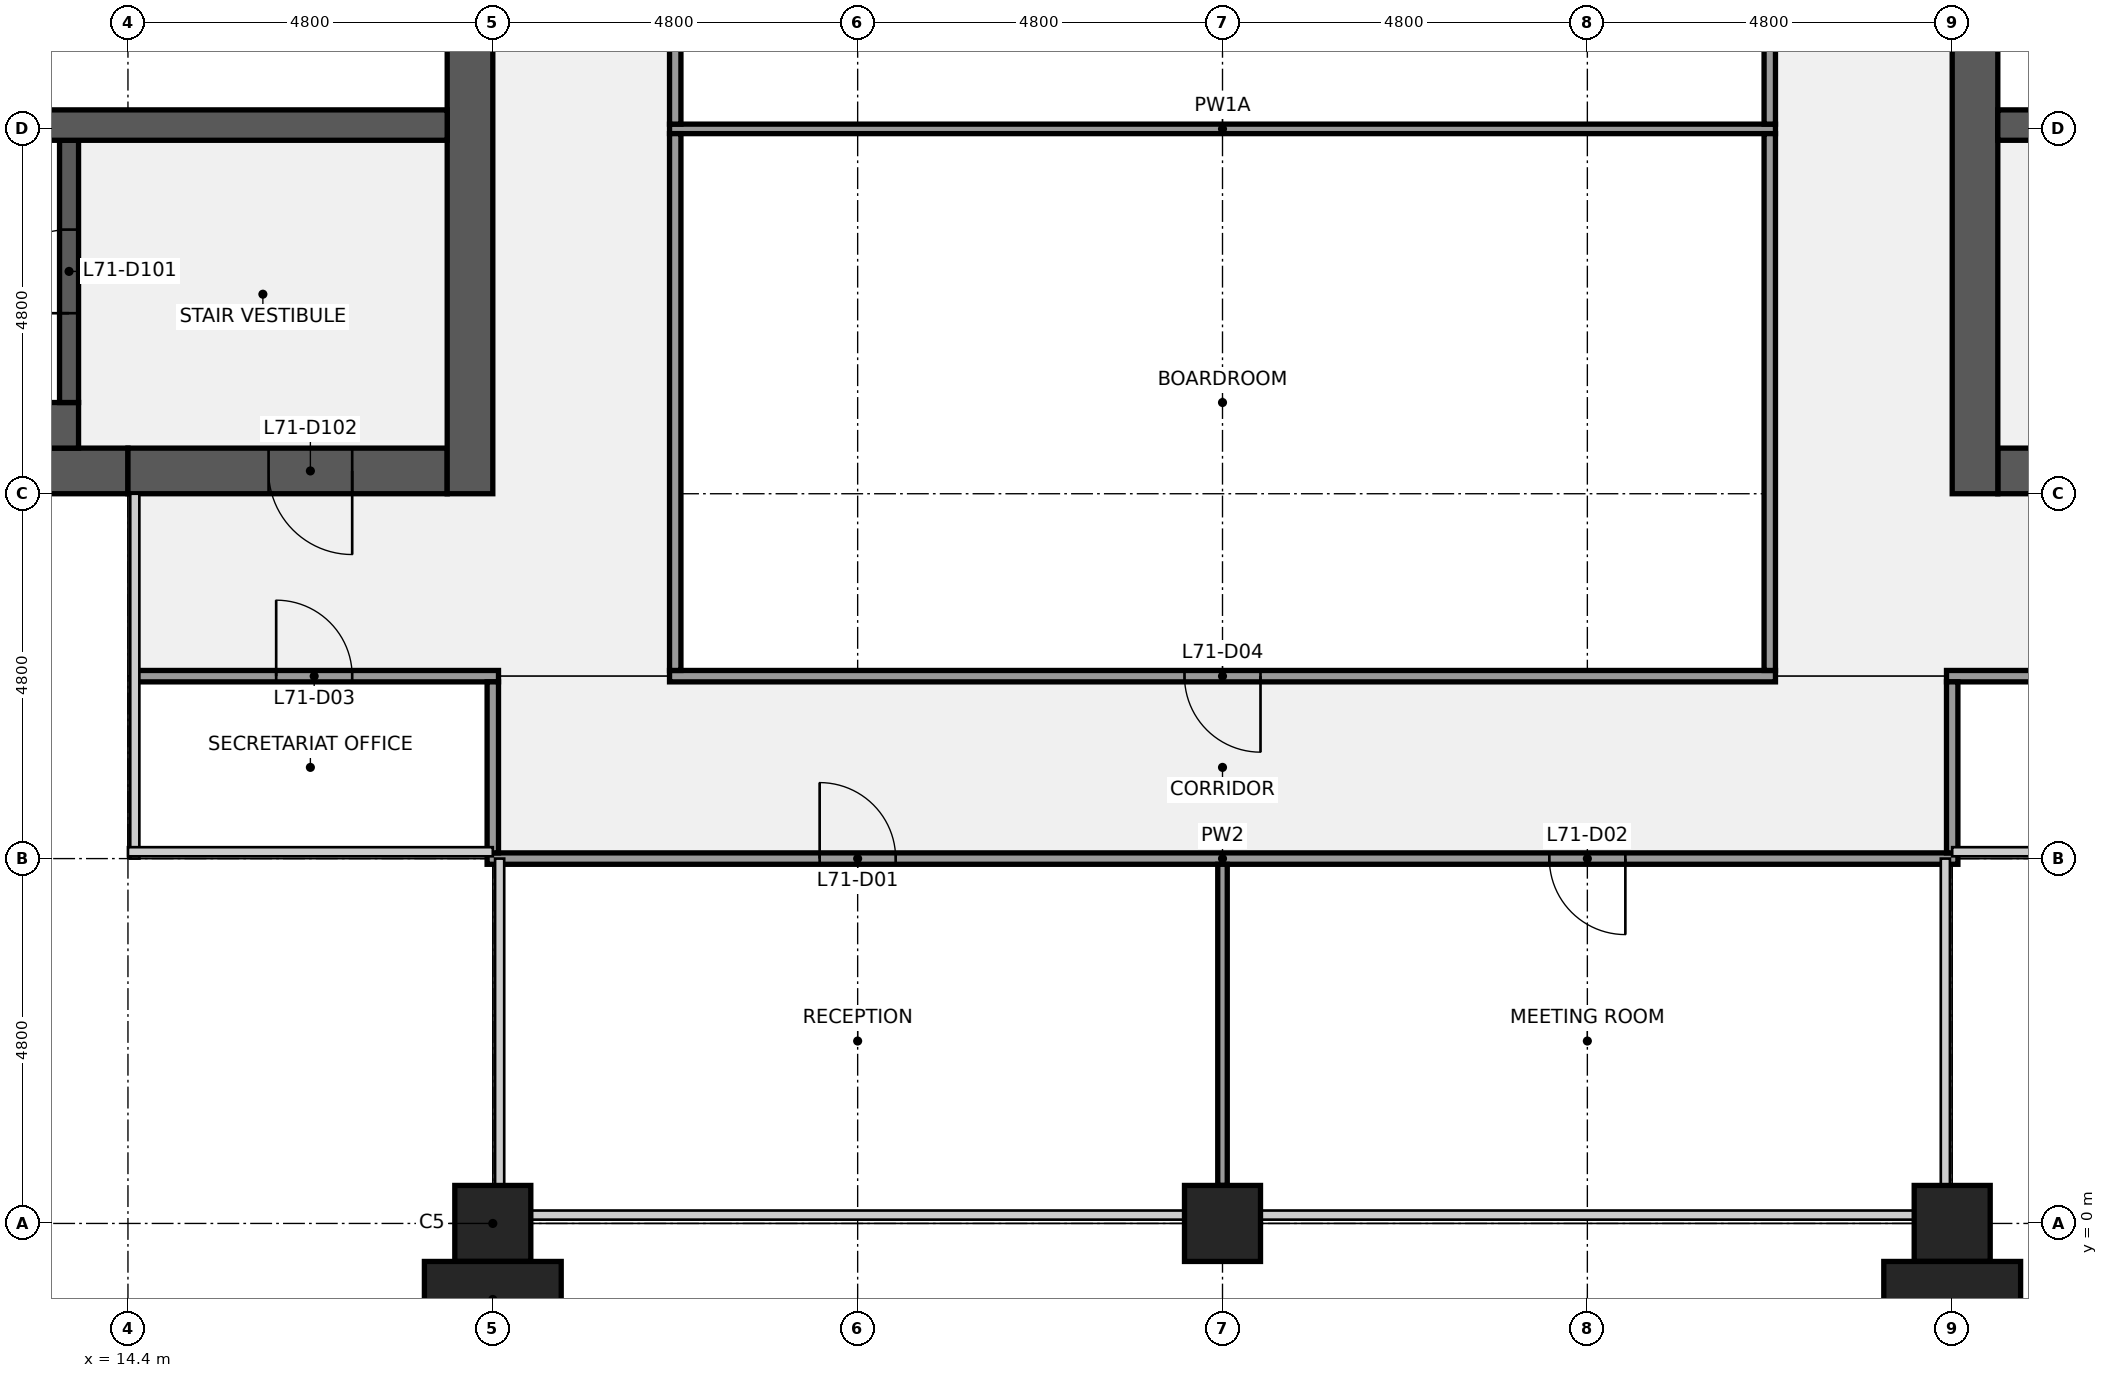
"""IFC4 building model, lengths in metres.
Left out: names, types, materials, properties, quantities, classifications, styles, units other than length and angle.
Written with IfcOpenShell. Run it as: python <this file> out.ifc"""

import sys

from ifc_helpers import new_model, si_unit, direction, frame, frame_2d, origin, origin_2d, place, context, subcontext, project, spatial, rectangle, extrude, element, fill, save


model = new_model("IFC4")
c1 = context("Model", 3, precision=1e-05, world=origin(), true_north=direction((0.0, 1.0)))
c2 = subcontext(c1, "Body", "Model", "MODEL_VIEW")
j1 = project(units=[si_unit("LENGTHUNIT", "METRE"), si_unit("PLANEANGLEUNIT", "RADIAN")], contexts=[c1])
p1 = place(None, origin())
s1 = spatial("IfcSite", under=j1, at=p1, CompositionType="ELEMENT")
p2 = place(p1, origin())
s2 = spatial("IfcBuilding", under=s1, at=p2, CompositionType="ELEMENT")
p3 = place(p2, frame((0.0, 0.0, 322.3)))
s3 = spatial("IfcBuildingStorey", under=s2, at=p3, CompositionType="ELEMENT", Elevation=322.3)
for number, where, z_axis, x_axis in (
    (1, (19.2, 0.0, 0.0), (0.0, 0.0, 1.0), (1.0, 0.0, 0.0)),
    (2, (28.8, 0.0, 0.0), (0.0, 0.0, 1.0), (1.0, 0.0, 0.0)),
    (3, (38.4, 0.0, 0.0), (0.0, 0.0, 1.0), (1.0, 0.0, 0.0)),
):
    element("IfcColumn", number, at=place(p3, frame(where, z_axis=z_axis, x_axis=x_axis)), inside=s3, PredefinedType="COLUMN", context=c2, shape_type="SweptSolid", body=[
        extrude(rectangle(XDim=1.0, YDim=1.0, at=origin_2d()), origin(), (0.0, 0.0, 1.0), 4.0),
    ])
p4 = place(p3, frame((14.4, 9.9, 0.0), z_axis=(0.0, 0.0, 1.0), x_axis=(-1.0, 0.0, 0.0)))
e4 = element("IfcWall", 4, at=p4, inside=s3, PredefinedType="SHEAR", context=c2, shape_type="SweptSolid", body=[
    extrude(rectangle(XDim=13.8, YDim=0.6, at=frame_2d((6.9, 0.0))), origin(), (0.0, 0.0, 1.0), 3.84),
])
p5 = place(p4, frame((6.3, 0.0, 0.9)))
e5 = element("IfcOpeningElement", 5, at=p5, cuts=e4, PredefinedType="OPENING", context=c2, shape_type="SweptSolid", body=[
    extrude(rectangle(XDim=1.8, YDim=1.5, at=frame_2d((0.9, 0.75))), frame((0.0, 0.31, 0.0), z_axis=(0.0, -1.0, 0.0), x_axis=(1.0, 0.0, 0.0)), (0.0, 0.0, 1.0), 0.62),
])
p6 = place(p4, frame((1.5, 0.0, 0.9)))
e6 = element("IfcOpeningElement", 6, at=p6, cuts=e4, PredefinedType="OPENING", context=c2, shape_type="SweptSolid", body=[
    extrude(rectangle(XDim=1.8, YDim=1.5, at=frame_2d((0.9, 0.75))), frame((0.0, 0.31, 0.0), z_axis=(0.0, -1.0, 0.0), x_axis=(1.0, 0.0, 0.0)), (0.0, 0.0, 1.0), 0.62),
])
p7 = place(p3, frame((18.6, 9.9, 0.0), z_axis=(0.0, 0.0, 1.0), x_axis=(-1.0, 0.0, 0.0)))
e7 = element("IfcWall", 7, at=p7, inside=s3, PredefinedType="SHEAR", context=c2, shape_type="SweptSolid", body=[
    extrude(rectangle(XDim=4.2, YDim=0.6, at=frame_2d((2.1, 0.0))), origin(), (0.0, 0.0, 1.0), 3.84),
])
p8 = place(p7, frame((1.25, 0.0, 0.0)))
e8 = element("IfcOpeningElement", 8, at=p8, cuts=e7, PredefinedType="OPENING", context=c2, shape_type="SweptSolid", body=[
    extrude(rectangle(XDim=1.1, YDim=2.1, at=frame_2d((0.55, 1.05))), frame((0.0, 0.31, 0.0), z_axis=(0.0, -1.0, 0.0), x_axis=(1.0, 0.0, 0.0)), (0.0, 0.0, 1.0), 0.62),
])
p9 = place(p3, frame((18.9, 38.4, 0.0), z_axis=(0.0, 0.0, 1.0), x_axis=(0.0, -1.0, 0.0)))
e9 = element("IfcWall", 9, at=p9, inside=s3, PredefinedType="SHEAR", context=c2, shape_type="SweptSolid", body=[
    extrude(rectangle(XDim=28.8, YDim=0.6, at=frame_2d((14.4, 0.0))), origin(), (0.0, 0.0, 1.0), 3.84),
])
p10 = place(p9, frame((18.3, 0.0, 0.0)))
e10 = element("IfcOpeningElement", 10, at=p10, cuts=e9, PredefinedType="OPENING", context=c2, shape_type="SweptSolid", body=[
    extrude(rectangle(XDim=1.8, YDim=2.1, at=frame_2d((0.9, 1.05))), frame((0.0, 0.31, 0.0), z_axis=(0.0, -1.0, 0.0), x_axis=(1.0, 0.0, 0.0)), (0.0, 0.0, 1.0), 0.62),
])
p11 = place(p9, frame((8.7, 0.0, 0.0)))
e11 = element("IfcOpeningElement", 11, at=p11, cuts=e9, PredefinedType="OPENING", context=c2, shape_type="SweptSolid", body=[
    extrude(rectangle(XDim=1.8, YDim=2.1, at=frame_2d((0.9, 1.05))), frame((0.0, 0.31, 0.0), z_axis=(0.0, -1.0, 0.0), x_axis=(1.0, 0.0, 0.0)), (0.0, 0.0, 1.0), 0.62),
])
p12 = place(p3, frame((6.25, 10.5, 0.0), z_axis=(0.0, 0.0, 1.0), x_axis=(1.0, 0.0, 0.0)))
e12 = element("IfcWall", 12, at=p12, inside=s3, PredefinedType="SHEAR", context=c2, shape_type="SweptSolid", body=[
    extrude(rectangle(XDim=7.5, YDim=0.6, at=frame_2d((3.75, 0.0))), origin(), (0.0, 0.0, 1.0), 3.84),
])
p13 = place(p3, frame((13.625, 10.8, 0.0), z_axis=(0.0, 0.0, 1.0), x_axis=(0.0, 1.0, 0.0)))
e13 = element("IfcWall", 13, at=p13, inside=s3, PredefinedType="SHEAR", context=c2, shape_type="SweptSolid", body=[
    extrude(rectangle(XDim=3.45, YDim=0.25, at=frame_2d((1.725, 0.0))), origin(), (0.0, 0.0, 1.0), 3.84),
])
p14 = place(p13, frame((1.175, 0.0, 0.0)))
e14 = element("IfcOpeningElement", 14, at=p14, cuts=e13, PredefinedType="OPENING", context=c2, shape_type="SweptSolid", body=[
    extrude(rectangle(XDim=1.1, YDim=2.1, at=frame_2d((0.55, 1.05))), frame((0.0, 0.135, 0.0), z_axis=(0.0, -1.0, 0.0), x_axis=(1.0, 0.0, 0.0)), (0.0, 0.0, 1.0), 0.27),
])
p15 = place(p3, frame((0.6, 14.45, 0.0), z_axis=(0.0, 0.0, 1.0), x_axis=(1.0, 0.0, 0.0)))
e15 = element("IfcWall", 15, at=p15, inside=s3, PredefinedType="SHEAR", context=c2, shape_type="SweptSolid", body=[
    extrude(rectangle(XDim=18.0, YDim=0.4, at=frame_2d((9.0, 0.0))), origin(), (0.0, 0.0, 1.0), 3.84),
])
p16 = place(p3, frame((43.2, 9.9, 0.0), z_axis=(0.0, 0.0, 1.0), x_axis=(-1.0, 0.0, 0.0)))
e16 = element("IfcWall", 16, at=p16, inside=s3, PredefinedType="SHEAR", context=c2, shape_type="SweptSolid", body=[
    extrude(rectangle(XDim=4.2, YDim=0.6, at=frame_2d((2.1, 0.0))), origin(), (0.0, 0.0, 1.0), 3.84),
])
p17 = place(p16, frame((1.85, 0.0, 0.0)))
e17 = element("IfcOpeningElement", 17, at=p17, cuts=e16, PredefinedType="OPENING", context=c2, shape_type="SweptSolid", body=[
    extrude(rectangle(XDim=1.1, YDim=2.1, at=frame_2d((0.55, 1.05))), frame((0.0, 0.31, 0.0), z_axis=(0.0, -1.0, 0.0), x_axis=(1.0, 0.0, 0.0)), (0.0, 0.0, 1.0), 0.62),
])
p18 = place(p3, frame((38.7, 9.6, 0.0), z_axis=(0.0, 0.0, 1.0), x_axis=(0.0, 1.0, 0.0)))
e18 = element("IfcWall", 18, at=p18, inside=s3, PredefinedType="SHEAR", context=c2, shape_type="SweptSolid", body=[
    extrude(rectangle(XDim=28.8, YDim=0.6, at=frame_2d((14.4, 0.0))), origin(), (0.0, 0.0, 1.0), 3.84),
])
p19 = place(p18, frame((8.7, 0.0, 0.0)))
e19 = element("IfcOpeningElement", 19, at=p19, cuts=e18, PredefinedType="OPENING", context=c2, shape_type="SweptSolid", body=[
    extrude(rectangle(XDim=1.8, YDim=2.1, at=frame_2d((0.9, 1.05))), frame((0.0, 0.31, 0.0), z_axis=(0.0, -1.0, 0.0), x_axis=(1.0, 0.0, 0.0)), (0.0, 0.0, 1.0), 0.62),
])
p20 = place(p18, frame((18.3, 0.0, 0.0)))
e20 = element("IfcOpeningElement", 20, at=p20, cuts=e18, PredefinedType="OPENING", context=c2, shape_type="SweptSolid", body=[
    extrude(rectangle(XDim=1.8, YDim=2.1, at=frame_2d((0.9, 1.05))), frame((0.0, 0.31, 0.0), z_axis=(0.0, -1.0, 0.0), x_axis=(1.0, 0.0, 0.0)), (0.0, 0.0, 1.0), 0.62),
])
p21 = place(p3, frame((39.0, 14.45, 0.0), z_axis=(0.0, 0.0, 1.0), x_axis=(1.0, 0.0, 0.0)))
e21 = element("IfcWall", 21, at=p21, inside=s3, PredefinedType="SHEAR", context=c2, shape_type="SweptSolid", body=[
    extrude(rectangle(XDim=18.0, YDim=0.4, at=frame_2d((9.0, 0.0))), origin(), (0.0, 0.0, 1.0), 3.84),
])
p22 = place(p3, frame((19.125, 4.8, 0.0), z_axis=(0.0, 0.0, 1.0), x_axis=(1.0, 0.0, 0.0)))
e22 = element("IfcWall", 22, at=p22, inside=s3, PredefinedType="PARTITIONING", context=c2, shape_type="SweptSolid", body=[
    extrude(rectangle(XDim=19.35, YDim=0.15, at=frame_2d((9.675, 0.0))), origin(), (0.0, 0.0, 1.0), 2.849),
])
p23 = place(p22, frame((4.375, 0.0, 0.0)))
e23 = element("IfcOpeningElement", 23, at=p23, cuts=e22, PredefinedType="OPENING", context=c2, shape_type="SweptSolid", body=[
    extrude(rectangle(XDim=1.0, YDim=2.1, at=frame_2d((0.5, 1.05))), frame((0.0, 0.085, 0.0), z_axis=(0.0, -1.0, 0.0), x_axis=(1.0, 0.0, 0.0)), (0.0, 0.0, 1.0), 0.17),
])
p24 = place(p22, frame((13.975, 0.0, 0.0)))
e24 = element("IfcOpeningElement", 24, at=p24, cuts=e22, PredefinedType="OPENING", context=c2, shape_type="SweptSolid", body=[
    extrude(rectangle(XDim=1.0, YDim=2.1, at=frame_2d((0.5, 1.05))), frame((0.0, 0.085, 0.0), z_axis=(0.0, -1.0, 0.0), x_axis=(1.0, 0.0, 0.0)), (0.0, 0.0, 1.0), 0.17),
])
p25 = place(p3, frame((14.5, 7.2, 0.0), z_axis=(0.0, 0.0, 1.0), x_axis=(1.0, 0.0, 0.0)))
e25 = element("IfcWall", 25, at=p25, inside=s3, PredefinedType="PARTITIONING", context=c2, shape_type="SweptSolid", body=[
    extrude(rectangle(XDim=4.775, YDim=0.15, at=frame_2d((2.387, 0.0))), origin(), (0.0, 0.0, 1.0), 2.849),
])
p26 = place(p25, frame((1.85, 0.0, 0.0)))
e26 = element("IfcOpeningElement", 26, at=p26, cuts=e25, PredefinedType="OPENING", context=c2, shape_type="SweptSolid", body=[
    extrude(rectangle(XDim=1.0, YDim=2.1, at=frame_2d((0.5, 1.05))), frame((0.0, 0.085, 0.0), z_axis=(0.0, -1.0, 0.0), x_axis=(1.0, 0.0, 0.0)), (0.0, 0.0, 1.0), 0.17),
])
p27 = place(p3, frame((21.525, 7.2, 0.0), z_axis=(0.0, 0.0, 1.0), x_axis=(1.0, 0.0, 0.0)))
e27 = element("IfcWall", 27, at=p27, inside=s3, PredefinedType="PARTITIONING", context=c2, shape_type="SweptSolid", body=[
    extrude(rectangle(XDim=14.55, YDim=0.15, at=frame_2d((7.275, 0.0))), origin(), (0.0, 0.0, 1.0), 2.849),
])
p28 = place(p27, frame((6.775, 0.0, 0.0)))
e28 = element("IfcOpeningElement", 28, at=p28, cuts=e27, PredefinedType="OPENING", context=c2, shape_type="SweptSolid", body=[
    extrude(rectangle(XDim=1.0, YDim=2.1, at=frame_2d((0.5, 1.05))), frame((0.0, 0.085, 0.0), z_axis=(0.0, -1.0, 0.0), x_axis=(1.0, 0.0, 0.0)), (0.0, 0.0, 1.0), 0.17),
])
p29 = place(p3, frame((38.325, 7.2, 0.0), z_axis=(0.0, 0.0, 1.0), x_axis=(1.0, 0.0, 0.0)))
e29 = element("IfcWall", 29, at=p29, inside=s3, PredefinedType="PARTITIONING", context=c2, shape_type="SweptSolid", body=[
    extrude(rectangle(XDim=4.775, YDim=0.15, at=frame_2d((2.388, 0.0))), origin(), (0.0, 0.0, 1.0), 2.849),
])
p30 = place(p29, frame((1.925, 0.0, 0.0)))
e30 = element("IfcOpeningElement", 30, at=p30, cuts=e29, PredefinedType="OPENING", context=c2, shape_type="SweptSolid", body=[
    extrude(rectangle(XDim=1.0, YDim=2.1, at=frame_2d((0.5, 1.05))), frame((0.0, 0.085, 0.0), z_axis=(0.0, -1.0, 0.0), x_axis=(1.0, 0.0, 0.0)), (0.0, 0.0, 1.0), 0.17),
])
p31 = place(p3, frame((21.525, 14.4, 0.0), z_axis=(0.0, 0.0, 1.0), x_axis=(1.0, 0.0, 0.0)))
e31 = element("IfcWall", 31, at=p31, inside=s3, PredefinedType="PARTITIONING", context=c2, shape_type="SweptSolid", body=[
    extrude(rectangle(XDim=14.55, YDim=0.125, at=frame_2d((7.275, 0.0))), origin(), (0.0, 0.0, 1.0), 2.849),
])
p32 = place(p3, frame((19.2, 4.875, 0.0), z_axis=(0.0, 0.0, 1.0), x_axis=(0.0, 1.0, 0.0)))
e32 = element("IfcWall", 32, at=p32, inside=s3, PredefinedType="PARTITIONING", context=c2, shape_type="SweptSolid", body=[
    extrude(rectangle(XDim=2.25, YDim=0.15, at=frame_2d((1.125, 0.0))), origin(), (0.0, 0.0, 1.0), 2.849),
])
p33 = place(p3, frame((21.6, 7.275, 0.0), z_axis=(0.0, 0.0, 1.0), x_axis=(0.0, 1.0, 0.0)))
e33 = element("IfcWall", 33, at=p33, inside=s3, PredefinedType="PARTITIONING", context=c2, shape_type="SweptSolid", body=[
    extrude(rectangle(XDim=7.062, YDim=0.15, at=frame_2d((3.531, 0.0))), origin(), (0.0, 0.0, 1.0), 2.849),
])
p34 = place(p3, frame((21.6, 14.462, 0.0), z_axis=(0.0, 0.0, 1.0), x_axis=(0.0, 1.0, 0.0)))
e34 = element("IfcWall", 34, at=p34, inside=s3, PredefinedType="PARTITIONING", context=c2, shape_type="SweptSolid", body=[
    extrude(rectangle(XDim=7.075, YDim=0.15, at=frame_2d((3.538, 0.0))), origin(), (0.0, 0.0, 1.0), 2.849),
])
p35 = place(p34, frame((3.038, 0.0, 0.0)))
e35 = element("IfcOpeningElement", 35, at=p35, cuts=e34, PredefinedType="OPENING", context=c2, shape_type="SweptSolid", body=[
    extrude(rectangle(XDim=1.0, YDim=2.1, at=frame_2d((0.5, 1.05))), frame((0.0, 0.085, 0.0), z_axis=(0.0, -1.0, 0.0), x_axis=(1.0, 0.0, 0.0)), (0.0, 0.0, 1.0), 0.17),
])
p36 = place(p3, frame((28.8, 0.5, 0.0), z_axis=(0.0, 0.0, 1.0), x_axis=(0.0, 1.0, 0.0)))
e36 = element("IfcWall", 36, at=p36, inside=s3, PredefinedType="PARTITIONING", context=c2, shape_type="SweptSolid", body=[
    extrude(rectangle(XDim=4.225, YDim=0.125, at=frame_2d((2.113, 0.0))), origin(), (0.0, 0.0, 1.0), 2.849),
])
p37 = place(p3, frame((36.0, 7.275, 0.0), z_axis=(0.0, 0.0, 1.0), x_axis=(0.0, 1.0, 0.0)))
e37 = element("IfcWall", 37, at=p37, inside=s3, PredefinedType="PARTITIONING", context=c2, shape_type="SweptSolid", body=[
    extrude(rectangle(XDim=7.062, YDim=0.15, at=frame_2d((3.531, 0.0))), origin(), (0.0, 0.0, 1.0), 2.849),
])
p38 = place(p3, frame((36.0, 14.462, 0.0), z_axis=(0.0, 0.0, 1.0), x_axis=(0.0, 1.0, 0.0)))
e38 = element("IfcWall", 38, at=p38, inside=s3, PredefinedType="PARTITIONING", context=c2, shape_type="SweptSolid", body=[
    extrude(rectangle(XDim=7.075, YDim=0.15, at=frame_2d((3.538, 0.0))), origin(), (0.0, 0.0, 1.0), 2.849),
])
p39 = place(p3, frame((38.4, 4.875, 0.0), z_axis=(0.0, 0.0, 1.0), x_axis=(0.0, 1.0, 0.0)))
e39 = element("IfcWall", 39, at=p39, inside=s3, PredefinedType="PARTITIONING", context=c2, shape_type="SweptSolid", body=[
    extrude(rectangle(XDim=2.25, YDim=0.15, at=frame_2d((1.125, 0.0))), origin(), (0.0, 0.0, 1.0), 2.849),
])
for number, where, z_axis, x_axis in (
    (40, (19.2, -1.0, 0.0), (0.0, 0.0, 1.0), (1.0, 0.0, 0.0)),
    (41, (38.4, -1.0, 0.0), (0.0, 0.0, 1.0), (1.0, 0.0, 0.0)),
):
    element("IfcColumn", number, at=place(p3, frame(where, z_axis=z_axis, x_axis=x_axis)), inside=s3, PredefinedType="PILASTER", context=c2, shape_type="SweptSolid", body=[
        extrude(rectangle(XDim=1.8, YDim=1.0, at=origin_2d()), origin(), (0.0, 0.0, 1.0), 4.0),
    ])
p40 = place(p14, origin())
e42 = element("IfcDoor", 42, at=p40, inside=s3, OperationType="SINGLE_SWING_LEFT", PredefinedType="DOOR", context=c2, shape_type="SweptSolid", body=[
    extrude(rectangle(XDim=1.1, YDim=2.1, at=frame_2d((0.55, 1.05))), frame((0.0, 0.025, 0.0), z_axis=(0.0, -1.0, 0.0), x_axis=(1.0, 0.0, 0.0)), (0.0, 0.0, 1.0), 0.05),
])
fill(e14, e42)
p41 = place(p8, origin())
e43 = element("IfcDoor", 43, at=p41, inside=s3, OperationType="SINGLE_SWING_LEFT", PredefinedType="DOOR", context=c2, shape_type="SweptSolid", body=[
    extrude(rectangle(XDim=1.1, YDim=2.1, at=frame_2d((0.55, 1.05))), frame((0.0, 0.025, 0.0), z_axis=(0.0, -1.0, 0.0), x_axis=(1.0, 0.0, 0.0)), (0.0, 0.0, 1.0), 0.05),
])
fill(e8, e43)
p42 = place(p23, origin())
e44 = element("IfcDoor", 44, at=p42, inside=s3, OperationType="SINGLE_SWING_LEFT", PredefinedType="DOOR", context=c2, shape_type="SweptSolid", body=[
    extrude(rectangle(XDim=1.0, YDim=2.1, at=frame_2d((0.5, 1.05))), frame((0.0, 0.025, 0.0), z_axis=(0.0, -1.0, 0.0), x_axis=(1.0, 0.0, 0.0)), (0.0, 0.0, 1.0), 0.05),
])
fill(e23, e44)
p43 = place(p24, origin())
e45 = element("IfcDoor", 45, at=p43, inside=s3, OperationType="SINGLE_SWING_RIGHT", PredefinedType="DOOR", context=c2, shape_type="SweptSolid", body=[
    extrude(rectangle(XDim=1.0, YDim=2.1, at=frame_2d((0.5, 1.05))), frame((0.0, 0.025, 0.0), z_axis=(0.0, -1.0, 0.0), x_axis=(1.0, 0.0, 0.0)), (0.0, 0.0, 1.0), 0.05),
])
fill(e24, e45)
p44 = place(p26, origin())
e46 = element("IfcDoor", 46, at=p44, inside=s3, OperationType="SINGLE_SWING_LEFT", PredefinedType="DOOR", context=c2, shape_type="SweptSolid", body=[
    extrude(rectangle(XDim=1.0, YDim=2.1, at=frame_2d((0.5, 1.05))), frame((0.0, 0.025, 0.0), z_axis=(0.0, -1.0, 0.0), x_axis=(1.0, 0.0, 0.0)), (0.0, 0.0, 1.0), 0.05),
])
fill(e26, e46)
p45 = place(p28, origin())
e47 = element("IfcDoor", 47, at=p45, inside=s3, OperationType="SINGLE_SWING_RIGHT", PredefinedType="DOOR", context=c2, shape_type="SweptSolid", body=[
    extrude(rectangle(XDim=1.0, YDim=2.1, at=frame_2d((0.5, 1.05))), frame((0.0, 0.025, 0.0), z_axis=(0.0, -1.0, 0.0), x_axis=(1.0, 0.0, 0.0)), (0.0, 0.0, 1.0), 0.05),
])
fill(e28, e47)
save(model, sys.argv[1])
